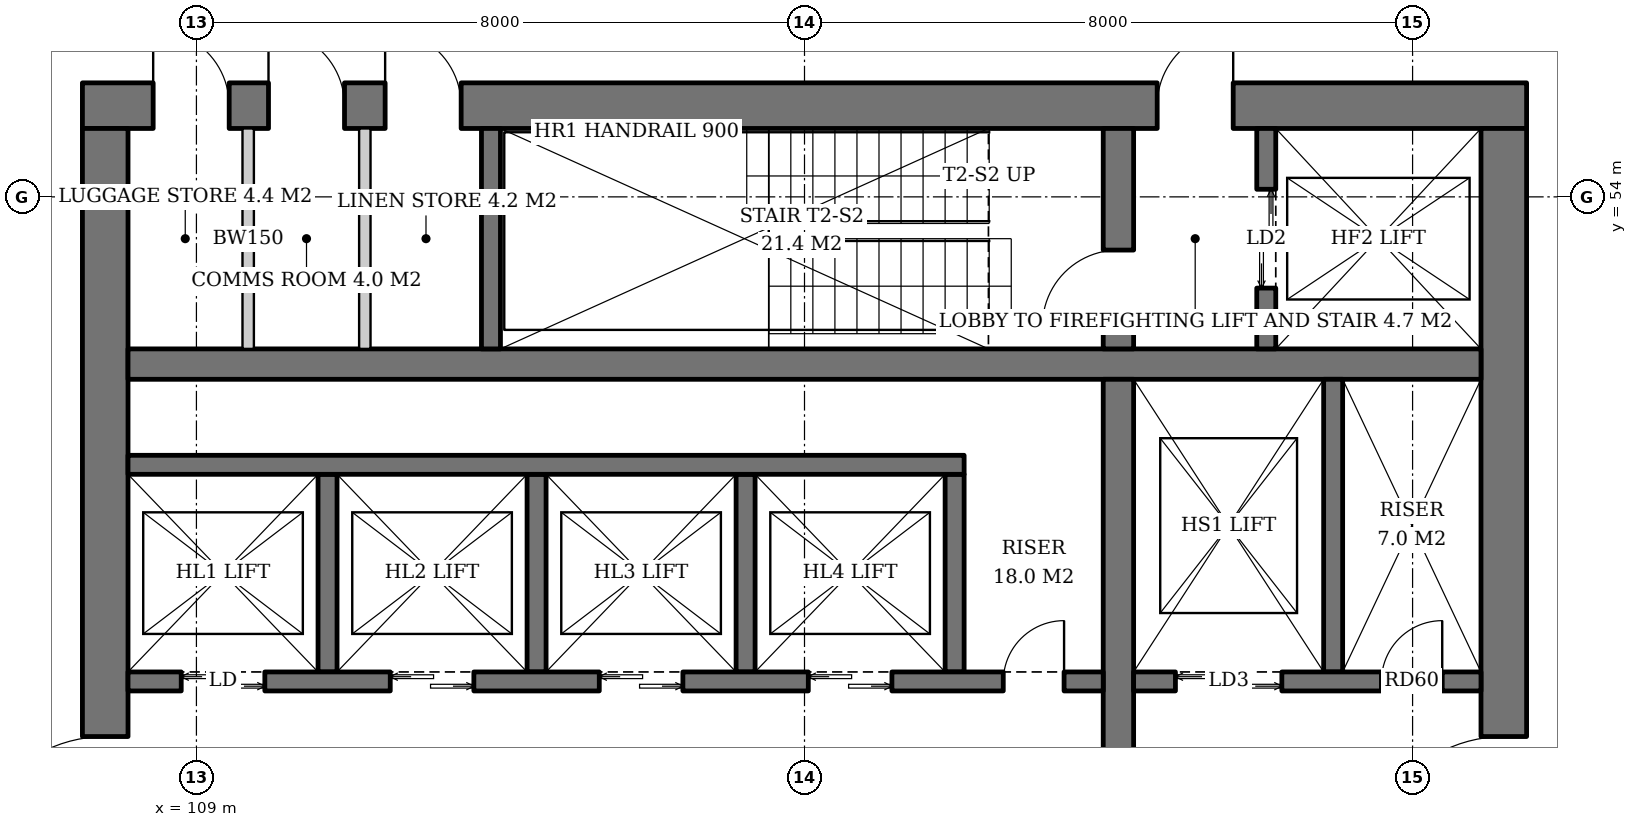
"""IFC4 building model, lengths in metres.
Left out: names, types, materials, properties, quantities, classifications, styles, units other than length and angle.
Written with IfcOpenShell. Run it as: python <this file> out.ifc"""

import sys

from ifc_helpers import new_model, si_unit, direction, frame, frame_2d, origin, place, context, subcontext, project, spatial, rectangle, extrude, element, fill, save


model = new_model("IFC4")
c1 = context("Model", 3, precision=1e-05, world=origin(), true_north=direction((0.0, 1.0)))
c2 = subcontext(c1, "Body", "Model", "MODEL_VIEW")
j1 = project(units=[si_unit("LENGTHUNIT", "METRE"), si_unit("PLANEANGLEUNIT", "RADIAN")], contexts=[c1])
p1 = place(None, origin())
s1 = spatial("IfcSite", under=j1, at=p1, CompositionType="ELEMENT")
p2 = place(p1, origin())
s2 = spatial("IfcBuilding", under=s1, at=p2, CompositionType="ELEMENT")
p3 = place(p2, frame((0.0, 0.0, 66.6)))
s3 = spatial("IfcBuildingStorey", under=s2, at=p3, CompositionType="ELEMENT", Elevation=66.6)
p4 = place(p3, frame((107.5, 55.2, 0.0), z_axis=(0.0, 0.0, 1.0), x_axis=(1.0, 0.0, 0.0)))
e1 = element("IfcWall", 1, at=p4, inside=s3, PredefinedType="SHEAR", context=c2, shape_type="SweptSolid", body=[
    extrude(rectangle(XDim=19.0, YDim=0.6, at=frame_2d((9.5, 0.0))), origin(), (0.0, 0.0, 1.0), 3.8),
])
p5 = place(p4, frame((14.14, 0.0, 0.0)))
e2 = element("IfcOpeningElement", 2, at=p5, cuts=e1, PredefinedType="OPENING", context=c2, shape_type="SweptSolid", body=[
    extrude(rectangle(XDim=1.0, YDim=2.1, at=frame_2d((0.5, 1.05))), frame((0.0, 0.31, 0.0), z_axis=(0.0, -1.0, 0.0), x_axis=(1.0, 0.0, 0.0)), (0.0, 0.0, 1.0), 0.62),
])
p6 = place(p4, frame((0.931, 0.0, 0.0)))
e3 = element("IfcOpeningElement", 3, at=p6, cuts=e1, PredefinedType="OPENING", context=c2, shape_type="SweptSolid", body=[
    extrude(rectangle(XDim=1.0, YDim=2.1, at=frame_2d((0.5, 1.05))), frame((0.0, 0.31, 0.0), z_axis=(0.0, -1.0, 0.0), x_axis=(1.0, 0.0, 0.0)), (0.0, 0.0, 1.0), 0.62),
])
p7 = place(p4, frame((2.448, 0.0, 0.0)))
e4 = element("IfcOpeningElement", 4, at=p7, cuts=e1, PredefinedType="OPENING", context=c2, shape_type="SweptSolid", body=[
    extrude(rectangle(XDim=1.0, YDim=2.1, at=frame_2d((0.5, 1.05))), frame((0.0, 0.31, 0.0), z_axis=(0.0, -1.0, 0.0), x_axis=(1.0, 0.0, 0.0)), (0.0, 0.0, 1.0), 0.62),
])
p8 = place(p4, frame((3.983, 0.0, 0.0)))
e5 = element("IfcOpeningElement", 5, at=p8, cuts=e1, PredefinedType="OPENING", context=c2, shape_type="SweptSolid", body=[
    extrude(rectangle(XDim=1.0, YDim=2.1, at=frame_2d((0.5, 1.05))), frame((0.0, 0.31, 0.0), z_axis=(0.0, -1.0, 0.0), x_axis=(1.0, 0.0, 0.0)), (0.0, 0.0, 1.0), 0.62),
])
p9 = place(p3, frame((107.8, 37.1, 0.0), z_axis=(0.0, 0.0, 1.0), x_axis=(0.0, 1.0, 0.0)))
e6 = element("IfcWall", 6, at=p9, inside=s3, PredefinedType="SHEAR", context=c2, shape_type="SweptSolid", body=[
    extrude(rectangle(XDim=17.8, YDim=0.6, at=frame_2d((8.9, 0.0))), origin(), (0.0, 0.0, 1.0), 3.8),
])
p10 = place(p9, frame((8.0, 0.0, 0.0)))
e7 = element("IfcOpeningElement", 7, at=p10, cuts=e6, PredefinedType="OPENING", context=c2, shape_type="SweptSolid", body=[
    extrude(rectangle(XDim=1.8, YDim=2.4, at=frame_2d((0.9, 1.2))), frame((0.0, 0.31, 0.0), z_axis=(0.0, -1.0, 0.0), x_axis=(1.0, 0.0, 0.0)), (0.0, 0.0, 1.0), 0.62),
])
p11 = place(p3, frame((126.2, 37.1, 0.0), z_axis=(0.0, 0.0, 1.0), x_axis=(0.0, 1.0, 0.0)))
e8 = element("IfcWall", 8, at=p11, inside=s3, PredefinedType="SHEAR", context=c2, shape_type="SweptSolid", body=[
    extrude(rectangle(XDim=17.8, YDim=0.6, at=frame_2d((8.9, 0.0))), origin(), (0.0, 0.0, 1.0), 3.8),
])
p12 = place(p11, frame((8.0, 0.0, 0.0)))
e9 = element("IfcOpeningElement", 9, at=p12, cuts=e8, PredefinedType="OPENING", context=c2, shape_type="SweptSolid", body=[
    extrude(rectangle(XDim=1.8, YDim=2.4, at=frame_2d((0.9, 1.2))), frame((0.0, 0.31, 0.0), z_axis=(0.0, -1.0, 0.0), x_axis=(1.0, 0.0, 0.0)), (0.0, 0.0, 1.0), 0.62),
])
p13 = place(p3, frame((108.1, 51.8, 0.0), z_axis=(0.0, 0.0, 1.0), x_axis=(1.0, 0.0, 0.0)))
e10 = element("IfcWall", 10, at=p13, inside=s3, PredefinedType="SHEAR", context=c2, shape_type="SweptSolid", body=[
    extrude(rectangle(XDim=17.8, YDim=0.4, at=frame_2d((8.9, 0.0))), origin(), (0.0, 0.0, 1.0), 3.8),
])
p14 = place(p3, frame((121.13, 40.4, 0.0), z_axis=(0.0, 0.0, 1.0), x_axis=(0.0, 1.0, 0.0)))
e11 = element("IfcWall", 11, at=p14, inside=s3, PredefinedType="SHEAR", context=c2, shape_type="SweptSolid", body=[
    extrude(rectangle(XDim=11.2, YDim=0.4, at=frame_2d((5.6, 0.0))), origin(), (0.0, 0.0, 1.0), 3.8),
])
p15 = place(p3, frame((121.13, 52.0, 0.0), z_axis=(0.0, 0.0, 1.0), x_axis=(0.0, 1.0, 0.0)))
e12 = element("IfcWall", 12, at=p15, inside=s3, PredefinedType="SHEAR", context=c2, shape_type="SweptSolid", body=[
    extrude(rectangle(XDim=2.9, YDim=0.4, at=frame_2d((1.45, 0.0))), origin(), (0.0, 0.0, 1.0), 3.8),
])
p16 = place(p15, frame((0.3, 0.0, 0.0)))
e13 = element("IfcOpeningElement", 13, at=p16, cuts=e12, PredefinedType="OPENING", context=c2, shape_type="SweptSolid", body=[
    extrude(rectangle(XDim=1.0, YDim=2.1, at=frame_2d((0.5, 1.05))), frame((0.0, 0.21, 0.0), z_axis=(0.0, -1.0, 0.0), x_axis=(1.0, 0.0, 0.0)), (0.0, 0.0, 1.0), 0.42),
])
p17 = place(p3, frame((112.875, 52.0, 0.0), z_axis=(0.0, 0.0, 1.0), x_axis=(0.0, 1.0, 0.0)))
e14 = element("IfcWall", 14, at=p17, inside=s3, PredefinedType="SHEAR", context=c2, shape_type="SweptSolid", body=[
    extrude(rectangle(XDim=2.9, YDim=0.25, at=frame_2d((1.45, 0.0))), origin(), (0.0, 0.0, 1.0), 3.8),
])
p18 = place(p3, frame((123.075, 52.0, 0.0), z_axis=(0.0, 0.0, 1.0), x_axis=(0.0, 1.0, 0.0)))
e15 = element("IfcWall", 15, at=p18, inside=s3, PredefinedType="SHEAR", context=c2, shape_type="SweptSolid", body=[
    extrude(rectangle(XDim=2.9, YDim=0.25, at=frame_2d((1.45, 0.0))), origin(), (0.0, 0.0, 1.0), 3.8),
])
p19 = place(p18, frame((0.8, 0.0, 0.0)))
e16 = element("IfcOpeningElement", 16, at=p19, cuts=e15, PredefinedType="OPENING", context=c2, shape_type="SweptSolid", body=[
    extrude(rectangle(XDim=1.3, YDim=2.2, at=frame_2d((0.65, 1.1))), frame((0.0, 0.135, 0.0), z_axis=(0.0, -1.0, 0.0), x_axis=(1.0, 0.0, 0.0)), (0.0, 0.0, 1.0), 0.27),
])
for number, where, z_axis, x_axis in (
    (17, (110.725, 47.75, 0.0), (0.0, 0.0, 1.0), (0.0, 1.0, 0.0)),
    (18, (113.475, 47.75, 0.0), (0.0, 0.0, 1.0), (0.0, 1.0, 0.0)),
    (19, (116.225, 47.75, 0.0), (0.0, 0.0, 1.0), (0.0, 1.0, 0.0)),
    (20, (118.975, 47.75, 0.0), (0.0, 0.0, 1.0), (0.0, 1.0, 0.0)),
):
    element("IfcWall", number, at=place(p3, frame(where, z_axis=z_axis, x_axis=x_axis)), inside=s3, PredefinedType="SHEAR", context=c2, shape_type="SweptSolid", body=[
        extrude(rectangle(XDim=2.6, YDim=0.25, at=frame_2d((1.3, 0.0))), origin(), (0.0, 0.0, 1.0), 3.8),
    ])
p20 = place(p3, frame((108.1, 50.475, 0.0), z_axis=(0.0, 0.0, 1.0), x_axis=(1.0, 0.0, 0.0)))
e21 = element("IfcWall", 21, at=p20, inside=s3, PredefinedType="SHEAR", context=c2, shape_type="SweptSolid", body=[
    extrude(rectangle(XDim=11.0, YDim=0.25, at=frame_2d((5.5, 0.0))), origin(), (0.0, 0.0, 1.0), 3.8),
])
p21 = place(p3, frame((108.1, 47.625, 0.0), z_axis=(0.0, 0.0, 1.0), x_axis=(1.0, 0.0, 0.0)))
e22 = element("IfcWall", 22, at=p21, inside=s3, PredefinedType="SHEAR", context=c2, shape_type="SweptSolid", body=[
    extrude(rectangle(XDim=12.83, YDim=0.25, at=frame_2d((6.415, 0.0))), origin(), (0.0, 0.0, 1.0), 3.8),
])
p22 = place(p21, frame((0.7, 0.0, 0.0)))
e23 = element("IfcOpeningElement", 23, at=p22, cuts=e22, PredefinedType="OPENING", context=c2, shape_type="SweptSolid", body=[
    extrude(rectangle(XDim=1.1, YDim=2.2, at=frame_2d((0.55, 1.1))), frame((0.0, 0.135, 0.0), z_axis=(0.0, -1.0, 0.0), x_axis=(1.0, 0.0, 0.0)), (0.0, 0.0, 1.0), 0.27),
])
p23 = place(p21, frame((3.45, 0.0, 0.0)))
e24 = element("IfcOpeningElement", 24, at=p23, cuts=e22, PredefinedType="OPENING", context=c2, shape_type="SweptSolid", body=[
    extrude(rectangle(XDim=1.1, YDim=2.2, at=frame_2d((0.55, 1.1))), frame((0.0, 0.135, 0.0), z_axis=(0.0, -1.0, 0.0), x_axis=(1.0, 0.0, 0.0)), (0.0, 0.0, 1.0), 0.27),
])
p24 = place(p21, frame((6.2, 0.0, 0.0)))
e25 = element("IfcOpeningElement", 25, at=p24, cuts=e22, PredefinedType="OPENING", context=c2, shape_type="SweptSolid", body=[
    extrude(rectangle(XDim=1.1, YDim=2.2, at=frame_2d((0.55, 1.1))), frame((0.0, 0.135, 0.0), z_axis=(0.0, -1.0, 0.0), x_axis=(1.0, 0.0, 0.0)), (0.0, 0.0, 1.0), 0.27),
])
p25 = place(p21, frame((8.95, 0.0, 0.0)))
e26 = element("IfcOpeningElement", 26, at=p25, cuts=e22, PredefinedType="OPENING", context=c2, shape_type="SweptSolid", body=[
    extrude(rectangle(XDim=1.1, YDim=2.2, at=frame_2d((0.55, 1.1))), frame((0.0, 0.135, 0.0), z_axis=(0.0, -1.0, 0.0), x_axis=(1.0, 0.0, 0.0)), (0.0, 0.0, 1.0), 0.27),
])
p26 = place(p21, frame((11.515, 0.0, 0.0)))
e27 = element("IfcOpeningElement", 27, at=p26, cuts=e22, PredefinedType="OPENING", context=c2, shape_type="SweptSolid", body=[
    extrude(rectangle(XDim=0.8, YDim=2.0, at=frame_2d((0.4, 1.0))), frame((0.0, 0.135, 0.0), z_axis=(0.0, -1.0, 0.0), x_axis=(1.0, 0.0, 0.0)), (0.0, 0.0, 1.0), 0.27),
])
p27 = place(p3, frame((123.955, 47.75, 0.0), z_axis=(0.0, 0.0, 1.0), x_axis=(0.0, 1.0, 0.0)))
e28 = element("IfcWall", 28, at=p27, inside=s3, PredefinedType="SHEAR", context=c2, shape_type="SweptSolid", body=[
    extrude(rectangle(XDim=3.85, YDim=0.25, at=frame_2d((1.925, 0.0))), origin(), (0.0, 0.0, 1.0), 3.8),
])
p28 = place(p3, frame((121.33, 47.625, 0.0), z_axis=(0.0, 0.0, 1.0), x_axis=(1.0, 0.0, 0.0)))
e29 = element("IfcWall", 29, at=p28, inside=s3, PredefinedType="SHEAR", context=c2, shape_type="SweptSolid", body=[
    extrude(rectangle(XDim=4.57, YDim=0.25, at=frame_2d((2.285, 0.0))), origin(), (0.0, 0.0, 1.0), 3.8),
])
p29 = place(p28, frame((0.55, 0.0, 0.0)))
e30 = element("IfcOpeningElement", 30, at=p29, cuts=e29, PredefinedType="OPENING", context=c2, shape_type="SweptSolid", body=[
    extrude(rectangle(XDim=1.4, YDim=2.4, at=frame_2d((0.7, 1.2))), frame((0.0, 0.135, 0.0), z_axis=(0.0, -1.0, 0.0), x_axis=(1.0, 0.0, 0.0)), (0.0, 0.0, 1.0), 0.27),
])
p30 = place(p28, frame((3.26, 0.0, 0.0)))
e31 = element("IfcOpeningElement", 31, at=p30, cuts=e29, PredefinedType="OPENING", context=c2, shape_type="SweptSolid", body=[
    extrude(rectangle(XDim=0.8, YDim=2.0, at=frame_2d((0.4, 1.0))), frame((0.0, 0.135, 0.0), z_axis=(0.0, -1.0, 0.0), x_axis=(1.0, 0.0, 0.0)), (0.0, 0.0, 1.0), 0.27),
])
for number, where, z_axis, x_axis in (
    (32, (109.681, 52.0, 0.0), (0.0, 0.0, 1.0), (0.0, 1.0, 0.0)),
    (33, (111.216, 52.0, 0.0), (0.0, 0.0, 1.0), (0.0, 1.0, 0.0)),
):
    element("IfcWall", number, at=place(p3, frame(where, z_axis=z_axis, x_axis=x_axis)), inside=s3, PredefinedType="SOLIDWALL", context=c2, shape_type="SweptSolid", body=[
        extrude(rectangle(XDim=2.9, YDim=0.15, at=frame_2d((1.45, 0.0))), origin(), (0.0, 0.0, 1.0), 3.6),
    ])
p31 = place(p19, origin())
e34 = element("IfcDoor", 34, at=p31, inside=s3, OperationType="DOUBLE_DOOR_SLIDING", PredefinedType="DOOR", context=c2, shape_type="SweptSolid", body=[
    extrude(rectangle(XDim=1.3, YDim=2.2, at=frame_2d((0.65, 1.1))), frame((0.0, 0.025, 0.0), z_axis=(0.0, -1.0, 0.0), x_axis=(1.0, 0.0, 0.0)), (0.0, 0.0, 1.0), 0.05),
])
fill(e16, e34)
p32 = place(p22, origin())
e35 = element("IfcDoor", 35, at=p32, inside=s3, OperationType="DOUBLE_DOOR_SLIDING", PredefinedType="DOOR", context=c2, shape_type="SweptSolid", body=[
    extrude(rectangle(XDim=1.1, YDim=2.2, at=frame_2d((0.55, 1.1))), frame((0.0, 0.025, 0.0), z_axis=(0.0, -1.0, 0.0), x_axis=(1.0, 0.0, 0.0)), (0.0, 0.0, 1.0), 0.05),
])
fill(e23, e35)
p33 = place(p23, origin())
e36 = element("IfcDoor", 36, at=p33, inside=s3, OperationType="DOUBLE_DOOR_SLIDING", PredefinedType="DOOR", context=c2, shape_type="SweptSolid", body=[
    extrude(rectangle(XDim=1.1, YDim=2.2, at=frame_2d((0.55, 1.1))), frame((0.0, 0.025, 0.0), z_axis=(0.0, -1.0, 0.0), x_axis=(1.0, 0.0, 0.0)), (0.0, 0.0, 1.0), 0.05),
])
fill(e24, e36)
p34 = place(p24, origin())
e37 = element("IfcDoor", 37, at=p34, inside=s3, OperationType="DOUBLE_DOOR_SLIDING", PredefinedType="DOOR", context=c2, shape_type="SweptSolid", body=[
    extrude(rectangle(XDim=1.1, YDim=2.2, at=frame_2d((0.55, 1.1))), frame((0.0, 0.025, 0.0), z_axis=(0.0, -1.0, 0.0), x_axis=(1.0, 0.0, 0.0)), (0.0, 0.0, 1.0), 0.05),
])
fill(e25, e37)
p35 = place(p25, origin())
e38 = element("IfcDoor", 38, at=p35, inside=s3, OperationType="DOUBLE_DOOR_SLIDING", PredefinedType="DOOR", context=c2, shape_type="SweptSolid", body=[
    extrude(rectangle(XDim=1.1, YDim=2.2, at=frame_2d((0.55, 1.1))), frame((0.0, 0.025, 0.0), z_axis=(0.0, -1.0, 0.0), x_axis=(1.0, 0.0, 0.0)), (0.0, 0.0, 1.0), 0.05),
])
fill(e26, e38)
p36 = place(p26, origin())
e39 = element("IfcDoor", 39, at=p36, inside=s3, OperationType="SINGLE_SWING_RIGHT", PredefinedType="DOOR", context=c2, shape_type="SweptSolid", body=[
    extrude(rectangle(XDim=0.8, YDim=2.0, at=frame_2d((0.4, 1.0))), frame((0.0, 0.025, 0.0), z_axis=(0.0, -1.0, 0.0), x_axis=(1.0, 0.0, 0.0)), (0.0, 0.0, 1.0), 0.05),
])
fill(e27, e39)
p37 = place(p29, origin())
e40 = element("IfcDoor", 40, at=p37, inside=s3, OperationType="DOUBLE_DOOR_SLIDING", PredefinedType="DOOR", context=c2, shape_type="SweptSolid", body=[
    extrude(rectangle(XDim=1.4, YDim=2.4, at=frame_2d((0.7, 1.2))), frame((0.0, 0.025, 0.0), z_axis=(0.0, -1.0, 0.0), x_axis=(1.0, 0.0, 0.0)), (0.0, 0.0, 1.0), 0.05),
])
fill(e30, e40)
p38 = place(p30, origin())
e41 = element("IfcDoor", 41, at=p38, inside=s3, OperationType="SINGLE_SWING_RIGHT", PredefinedType="DOOR", context=c2, shape_type="SweptSolid", body=[
    extrude(rectangle(XDim=0.8, YDim=2.0, at=frame_2d((0.4, 1.0))), frame((0.0, 0.025, 0.0), z_axis=(0.0, -1.0, 0.0), x_axis=(1.0, 0.0, 0.0)), (0.0, 0.0, 1.0), 0.05),
])
fill(e31, e41)
p39 = place(p16, origin())
e42 = element("IfcDoor", 42, at=p39, inside=s3, OperationType="SINGLE_SWING_LEFT", PredefinedType="DOOR", context=c2, shape_type="SweptSolid", body=[
    extrude(rectangle(XDim=1.0, YDim=2.1, at=frame_2d((0.5, 1.05))), frame((0.0, 0.025, 0.0), z_axis=(0.0, -1.0, 0.0), x_axis=(1.0, 0.0, 0.0)), (0.0, 0.0, 1.0), 0.05),
])
fill(e13, e42)
p40 = place(p5, origin())
e43 = element("IfcDoor", 43, at=p40, inside=s3, OperationType="SINGLE_SWING_RIGHT", PredefinedType="DOOR", context=c2, shape_type="SweptSolid", body=[
    extrude(rectangle(XDim=1.0, YDim=2.1, at=frame_2d((0.5, 1.05))), frame((0.0, 0.025, 0.0), z_axis=(0.0, -1.0, 0.0), x_axis=(1.0, 0.0, 0.0)), (0.0, 0.0, 1.0), 0.05),
])
fill(e2, e43)
p41 = place(p10, origin())
e44 = element("IfcDoor", 44, at=p41, inside=s3, OperationType="DOUBLE_DOOR_SINGLE_SWING", PredefinedType="DOOR", context=c2, shape_type="SweptSolid", body=[
    extrude(rectangle(XDim=1.8, YDim=2.4, at=frame_2d((0.9, 1.2))), frame((0.0, 0.025, 0.0), z_axis=(0.0, -1.0, 0.0), x_axis=(1.0, 0.0, 0.0)), (0.0, 0.0, 1.0), 0.05),
])
fill(e7, e44)
p42 = place(p12, origin())
e45 = element("IfcDoor", 45, at=p42, inside=s3, OperationType="DOUBLE_DOOR_SINGLE_SWING", PredefinedType="DOOR", context=c2, shape_type="SweptSolid", body=[
    extrude(rectangle(XDim=1.8, YDim=2.4, at=frame_2d((0.9, 1.2))), frame((0.0, 0.025, 0.0), z_axis=(0.0, -1.0, 0.0), x_axis=(1.0, 0.0, 0.0)), (0.0, 0.0, 1.0), 0.05),
])
fill(e9, e45)
p43 = place(p6, origin())
e46 = element("IfcDoor", 46, at=p43, inside=s3, OperationType="SINGLE_SWING_LEFT", PredefinedType="DOOR", context=c2, shape_type="SweptSolid", body=[
    extrude(rectangle(XDim=1.0, YDim=2.1, at=frame_2d((0.5, 1.05))), frame((0.0, -0.24, 0.0), z_axis=(0.0, -1.0, 0.0), x_axis=(1.0, 0.0, 0.0)), (0.0, 0.0, 1.0), 0.05),
])
fill(e3, e46)
p44 = place(p7, origin())
e47 = element("IfcDoor", 47, at=p44, inside=s3, OperationType="SINGLE_SWING_LEFT", PredefinedType="DOOR", context=c2, shape_type="SweptSolid", body=[
    extrude(rectangle(XDim=1.0, YDim=2.1, at=frame_2d((0.5, 1.05))), frame((0.0, -0.24, 0.0), z_axis=(0.0, -1.0, 0.0), x_axis=(1.0, 0.0, 0.0)), (0.0, 0.0, 1.0), 0.05),
])
fill(e4, e47)
p45 = place(p8, origin())
e48 = element("IfcDoor", 48, at=p45, inside=s3, OperationType="SINGLE_SWING_LEFT", PredefinedType="DOOR", context=c2, shape_type="SweptSolid", body=[
    extrude(rectangle(XDim=1.0, YDim=2.1, at=frame_2d((0.5, 1.05))), frame((0.0, -0.24, 0.0), z_axis=(0.0, -1.0, 0.0), x_axis=(1.0, 0.0, 0.0)), (0.0, 0.0, 1.0), 0.05),
])
fill(e5, e48)
save(model, sys.argv[1])
